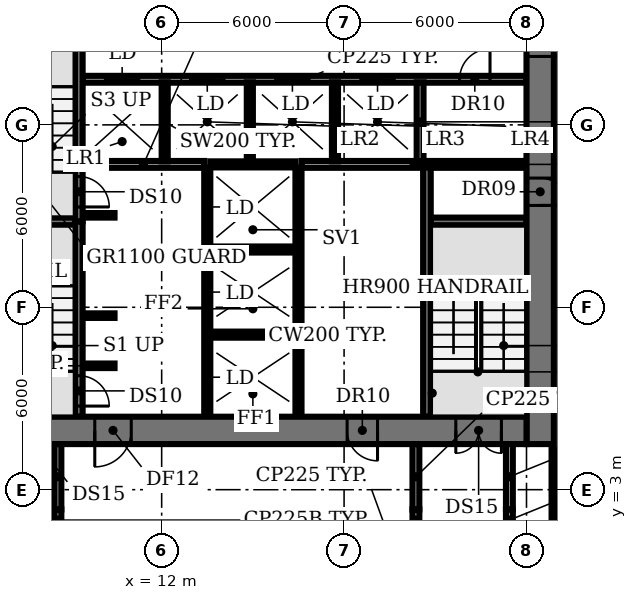
"""IFC4 building model, lengths in metres.
Left out: names, types, materials, properties, quantities, classifications, styles, units other than length and angle.
Written with IfcOpenShell. Run it as: python <this file> out.ifc"""

import sys

from ifc_helpers import new_model, si_unit, direction, frame, frame_2d, origin, place, context, subcontext, project, spatial, rectangle, extrude, element, fill, save


model = new_model("IFC4")
c1 = context("Model", 3, precision=1e-05, world=origin(), true_north=direction((0.0, 1.0)))
c2 = subcontext(c1, "Body", "Model", "MODEL_VIEW")
j1 = project(units=[si_unit("LENGTHUNIT", "METRE"), si_unit("PLANEANGLEUNIT", "RADIAN")], contexts=[c1])
p1 = place(None, origin())
s1 = spatial("IfcSite", under=j1, at=p1, CompositionType="ELEMENT")
p2 = place(p1, origin())
s2 = spatial("IfcBuilding", under=s1, at=p2, CompositionType="ELEMENT")
p3 = place(p2, origin())
s3 = spatial("IfcBuildingStorey", under=s2, at=p3, CompositionType="ELEMENT", Elevation=0.0)
p4 = place(p3, frame((9.4, 7.075, 0.0), z_axis=(0.0, 0.0, 1.0), x_axis=(1.0, 0.0, 0.0)))
e1 = element("IfcWall", 1, at=p4, inside=s3, PredefinedType="SHEAR", context=c2, shape_type="SweptSolid", body=[
    extrude(rectangle(XDim=1.05, YDim=0.15, at=frame_2d((0.525, 0.0))), origin(), (0.0, 0.0, 1.0), 5.65),
])
p5 = place(p3, frame((13.6, 8.1, 0.0), z_axis=(0.0, 0.0, 1.0), x_axis=(1.0, 0.0, 0.0)))
e2 = element("IfcWall", 2, at=p5, inside=s3, PredefinedType="SHEAR", context=c2, shape_type="SweptSolid", body=[
    extrude(rectangle(XDim=2.8, YDim=0.2, at=frame_2d((1.4, 0.0))), origin(), (0.0, 0.0, 1.0), 5.65),
])
for number, where, z_axis, x_axis in (
    (3, (9.4, 8.725, 0.0), (0.0, 0.0, 1.0), (1.0, 0.0, 0.0)),
    (4, (9.4, 10.375, 0.0), (0.0, 0.0, 1.0), (1.0, 0.0, 0.0)),
):
    element("IfcWall", number, at=place(p3, frame(where, z_axis=z_axis, x_axis=x_axis)), inside=s3, PredefinedType="SHEAR", context=c2, shape_type="SweptSolid", body=[
        extrude(rectangle(XDim=1.05, YDim=0.15, at=frame_2d((0.525, 0.0))), origin(), (0.0, 0.0, 1.0), 5.65),
    ])
p6 = place(p3, frame((13.6, 10.9, 0.0), z_axis=(0.0, 0.0, 1.0), x_axis=(1.0, 0.0, 0.0)))
e5 = element("IfcWall", 5, at=p6, inside=s3, PredefinedType="SHEAR", context=c2, shape_type="SweptSolid", body=[
    extrude(rectangle(XDim=2.8, YDim=0.2, at=frame_2d((1.4, 0.0))), origin(), (0.0, 0.0, 1.0), 5.65),
])
for number, where, z_axis, x_axis in (
    (6, (6.0, 11.825, 0.0), (0.0, 0.0, 1.0), (1.0, 0.0, 0.0)),
    (7, (20.85, 11.825, 0.0), (0.0, 0.0, 1.0), (1.0, 0.0, 0.0)),
):
    element("IfcWall", number, at=place(p3, frame(where, z_axis=z_axis, x_axis=x_axis)), inside=s3, PredefinedType="SHEAR", context=c2, shape_type="SweptSolid", body=[
        extrude(rectangle(XDim=3.15, YDim=0.25, at=frame_2d((1.575, 0.0))), origin(), (0.0, 0.0, 1.0), 5.65),
    ])
p7 = place(p3, frame((9.4, 12.025, 0.0), z_axis=(0.0, 0.0, 1.0), x_axis=(1.0, 0.0, 0.0)))
e8 = element("IfcWall", 8, at=p7, inside=s3, PredefinedType="SHEAR", context=c2, shape_type="SweptSolid", body=[
    extrude(rectangle(XDim=1.05, YDim=0.15, at=frame_2d((0.525, 0.0))), origin(), (0.0, 0.0, 1.0), 5.65),
])
p8 = place(p3, frame((9.4, 13.7, 0.0), z_axis=(0.0, 0.0, 1.0), x_axis=(1.0, 0.0, 0.0)))
e9 = element("IfcWall", 9, at=p8, inside=s3, PredefinedType="PARTITIONING", context=c2, shape_type="SweptSolid", body=[
    extrude(rectangle(XDim=4.0, YDim=0.225, at=frame_2d((2.0, 0.0))), origin(), (0.0, 0.0, 1.0), 5.65),
])
p9 = place(p3, frame((13.6, 13.7, 0.0), z_axis=(0.0, 0.0, 1.0), x_axis=(1.0, 0.0, 0.0)))
e10 = element("IfcWall", 10, at=p9, inside=s3, PredefinedType="SHEAR", context=c2, shape_type="SweptSolid", body=[
    extrude(rectangle(XDim=2.8, YDim=0.2, at=frame_2d((1.4, 0.0))), origin(), (0.0, 0.0, 1.0), 5.65),
])
p10 = place(p3, frame((16.6, 13.7, 0.0), z_axis=(0.0, 0.0, 1.0), x_axis=(1.0, 0.0, 0.0)))
e11 = element("IfcWall", 11, at=p10, inside=s3, PredefinedType="PARTITIONING", context=c2, shape_type="SweptSolid", body=[
    extrude(rectangle(XDim=7.4, YDim=0.225, at=frame_2d((3.7, 0.0))), origin(), (0.0, 0.0, 1.0), 5.65),
])
p11 = place(p3, frame((9.4, 16.5, 0.0), z_axis=(0.0, 0.0, 1.0), x_axis=(1.0, 0.0, 0.0)))
e12 = element("IfcWall", 12, at=p11, inside=s3, PredefinedType="PARTITIONING", context=c2, shape_type="SweptSolid", body=[
    extrude(rectangle(XDim=14.6, YDim=0.225, at=frame_2d((7.3, 0.0))), origin(), (0.0, 0.0, 1.0), 5.65),
])
p12 = place(p11, frame((0.75, 0.0, 0.0)))
e13 = element("IfcOpeningElement", 13, at=p12, cuts=e12, PredefinedType="OPENING", context=c2, shape_type="SweptSolid", body=[
    extrude(rectangle(XDim=1.1, YDim=2.1, at=frame_2d((0.55, 1.05))), frame((0.0, 0.123, 0.0), z_axis=(0.0, -1.0, 0.0), x_axis=(1.0, 0.0, 0.0)), (0.0, 0.0, 1.0), 0.245),
])
p13 = place(p11, frame((3.55, 0.0, 0.0)))
e14 = element("IfcOpeningElement", 14, at=p13, cuts=e12, PredefinedType="OPENING", context=c2, shape_type="SweptSolid", body=[
    extrude(rectangle(XDim=1.1, YDim=2.1, at=frame_2d((0.55, 1.05))), frame((0.0, 0.123, 0.0), z_axis=(0.0, -1.0, 0.0), x_axis=(1.0, 0.0, 0.0)), (0.0, 0.0, 1.0), 0.245),
])
p14 = place(p11, frame((6.35, 0.0, 0.0)))
e15 = element("IfcOpeningElement", 15, at=p14, cuts=e12, PredefinedType="OPENING", context=c2, shape_type="SweptSolid", body=[
    extrude(rectangle(XDim=1.1, YDim=2.1, at=frame_2d((0.55, 1.05))), frame((0.0, 0.123, 0.0), z_axis=(0.0, -1.0, 0.0), x_axis=(1.0, 0.0, 0.0)), (0.0, 0.0, 1.0), 0.245),
])
p15 = place(p11, frame((9.15, 0.0, 0.0)))
e16 = element("IfcOpeningElement", 16, at=p15, cuts=e12, PredefinedType="OPENING", context=c2, shape_type="SweptSolid", body=[
    extrude(rectangle(XDim=1.1, YDim=2.1, at=frame_2d((0.55, 1.05))), frame((0.0, 0.123, 0.0), z_axis=(0.0, -1.0, 0.0), x_axis=(1.0, 0.0, 0.0)), (0.0, 0.0, 1.0), 0.245),
])
p16 = place(p11, frame((12.4, 0.0, 0.0)))
e17 = element("IfcOpeningElement", 17, at=p16, cuts=e12, PredefinedType="OPENING", context=c2, shape_type="SweptSolid", body=[
    extrude(rectangle(XDim=1.0, YDim=2.1, at=frame_2d((0.5, 1.05))), frame((0.0, 0.123, 0.0), z_axis=(0.0, -1.0, 0.0), x_axis=(1.0, 0.0, 0.0)), (0.0, 0.0, 1.0), 0.245),
])
p17 = place(p3, frame((9.275, 11.825, 0.0), z_axis=(0.0, 0.0, 1.0), x_axis=(0.0, -1.0, 0.0)))
e18 = element("IfcWall", 18, at=p17, inside=s3, PredefinedType="SHEAR", context=c2, shape_type="SweptSolid", body=[
    extrude(rectangle(XDim=6.425, YDim=0.25, at=frame_2d((3.212, 0.0))), origin(), (0.0, 0.0, 1.0), 5.65),
])
p18 = place(p17, frame((5.075, 0.0, 0.0)))
e19 = element("IfcOpeningElement", 19, at=p18, cuts=e18, PredefinedType="OPENING", context=c2, shape_type="SweptSolid", body=[
    extrude(rectangle(XDim=1.0, YDim=2.1, at=frame_2d((0.5, 1.05))), frame((0.0, 0.135, 0.0), z_axis=(0.0, -1.0, 0.0), x_axis=(1.0, 0.0, 0.0)), (0.0, 0.0, 1.0), 0.27),
])
p19 = place(p3, frame((9.275, 18.375, 0.0), z_axis=(0.0, 0.0, 1.0), x_axis=(0.0, -1.0, 0.0)))
e20 = element("IfcWall", 20, at=p19, inside=s3, PredefinedType="SHEAR", context=c2, shape_type="SweptSolid", body=[
    extrude(rectangle(XDim=6.55, YDim=0.25, at=frame_2d((3.275, 0.0))), origin(), (0.0, 0.0, 1.0), 5.65),
])
p20 = place(p19, frame((5.075, 0.0, 0.0)))
e21 = element("IfcOpeningElement", 21, at=p20, cuts=e20, PredefinedType="OPENING", context=c2, shape_type="SweptSolid", body=[
    extrude(rectangle(XDim=1.0, YDim=2.1, at=frame_2d((0.5, 1.05))), frame((0.0, 0.135, 0.0), z_axis=(0.0, -1.0, 0.0), x_axis=(1.0, 0.0, 0.0)), (0.0, 0.0, 1.0), 0.27),
])
p21 = place(p3, frame((12.1, 13.8, 0.0), z_axis=(0.0, 0.0, 1.0), x_axis=(0.0, 1.0, 0.0)))
e22 = element("IfcWall", 22, at=p21, inside=s3, PredefinedType="SOLIDWALL", context=c2, shape_type="SweptSolid", body=[
    extrude(rectangle(XDim=2.6, YDim=0.2, at=frame_2d((1.3, 0.0))), origin(), (0.0, 0.0, 1.0), 5.65),
])
p22 = place(p3, frame((13.5, 5.4, 0.0), z_axis=(0.0, 0.0, 1.0), x_axis=(0.0, 1.0, 0.0)))
e23 = element("IfcWall", 23, at=p22, inside=s3, PredefinedType="SHEAR", context=c2, shape_type="SweptSolid", body=[
    extrude(rectangle(XDim=8.2, YDim=0.2, at=frame_2d((4.1, 0.0))), origin(), (0.0, 0.0, 1.0), 5.65),
])
p23 = place(p22, frame((0.75, 0.0, 0.0)))
e24 = element("IfcOpeningElement", 24, at=p23, cuts=e23, PredefinedType="OPENING", context=c2, shape_type="SweptSolid", body=[
    extrude(rectangle(XDim=1.1, YDim=2.1, at=frame_2d((0.55, 1.05))), frame((0.0, 0.11, 0.0), z_axis=(0.0, -1.0, 0.0), x_axis=(1.0, 0.0, 0.0)), (0.0, 0.0, 1.0), 0.22),
])
p24 = place(p22, frame((3.55, 0.0, 0.0)))
e25 = element("IfcOpeningElement", 25, at=p24, cuts=e23, PredefinedType="OPENING", context=c2, shape_type="SweptSolid", body=[
    extrude(rectangle(XDim=1.1, YDim=2.1, at=frame_2d((0.55, 1.05))), frame((0.0, 0.11, 0.0), z_axis=(0.0, -1.0, 0.0), x_axis=(1.0, 0.0, 0.0)), (0.0, 0.0, 1.0), 0.22),
])
p25 = place(p22, frame((6.35, 0.0, 0.0)))
e26 = element("IfcOpeningElement", 26, at=p25, cuts=e23, PredefinedType="OPENING", context=c2, shape_type="SweptSolid", body=[
    extrude(rectangle(XDim=1.1, YDim=2.1, at=frame_2d((0.55, 1.05))), frame((0.0, 0.11, 0.0), z_axis=(0.0, -1.0, 0.0), x_axis=(1.0, 0.0, 0.0)), (0.0, 0.0, 1.0), 0.22),
])
p26 = place(p3, frame((14.9, 13.8, 0.0), z_axis=(0.0, 0.0, 1.0), x_axis=(0.0, 1.0, 0.0)))
e27 = element("IfcWall", 27, at=p26, inside=s3, PredefinedType="SOLIDWALL", context=c2, shape_type="SweptSolid", body=[
    extrude(rectangle(XDim=2.6, YDim=0.2, at=frame_2d((1.3, 0.0))), origin(), (0.0, 0.0, 1.0), 5.65),
])
p27 = place(p3, frame((16.5, 5.4, 0.0), z_axis=(0.0, 0.0, 1.0), x_axis=(0.0, 1.0, 0.0)))
e28 = element("IfcWall", 28, at=p27, inside=s3, PredefinedType="SHEAR", context=c2, shape_type="SweptSolid", body=[
    extrude(rectangle(XDim=8.2, YDim=0.2, at=frame_2d((4.1, 0.0))), origin(), (0.0, 0.0, 1.0), 5.65),
])
p28 = place(p3, frame((17.7, 13.8, 0.0), z_axis=(0.0, 0.0, 1.0), x_axis=(0.0, 1.0, 0.0)))
e29 = element("IfcWall", 29, at=p28, inside=s3, PredefinedType="SOLIDWALL", context=c2, shape_type="SweptSolid", body=[
    extrude(rectangle(XDim=2.6, YDim=0.2, at=frame_2d((1.3, 0.0))), origin(), (0.0, 0.0, 1.0), 5.65),
])
p29 = place(p3, frame((20.5, 13.8, 0.0), z_axis=(0.0, 0.0, 1.0), x_axis=(0.0, 1.0, 0.0)))
e30 = element("IfcWall", 30, at=p29, inside=s3, PredefinedType="PARTITIONING", context=c2, shape_type="SweptSolid", body=[
    extrude(rectangle(XDim=2.6, YDim=0.225, at=frame_2d((1.3, 0.0))), origin(), (0.0, 0.0, 1.0), 5.65),
])
p30 = place(p3, frame((20.725, 5.4, 0.0), z_axis=(0.0, 0.0, 1.0), x_axis=(0.0, 1.0, 0.0)))
e31 = element("IfcWall", 31, at=p30, inside=s3, PredefinedType="SHEAR", context=c2, shape_type="SweptSolid", body=[
    extrude(rectangle(XDim=8.2, YDim=0.25, at=frame_2d((4.1, 0.0))), origin(), (0.0, 0.0, 1.0), 5.65),
])
p31 = place(p3, frame((24.45, 25.7, 0.0), z_axis=(0.0, 0.0, 1.0), x_axis=(0.0, -1.0, 0.0)))
e32 = element("IfcWall", 32, at=p31, inside=s3, PredefinedType="SHEAR", context=c2, shape_type="SweptSolid", body=[
    extrude(rectangle(XDim=21.2, YDim=0.9, at=frame_2d((10.6, 0.0))), origin(), (0.0, 0.0, 1.0), 5.65),
])
p32 = place(p31, frame((12.45, 0.0, 0.0)))
e33 = element("IfcOpeningElement", 33, at=p32, cuts=e32, PredefinedType="OPENING", context=c2, shape_type="SweptSolid", body=[
    extrude(rectangle(XDim=0.9, YDim=2.1, at=frame_2d((0.45, 1.05))), frame((0.0, 0.46, 0.0), z_axis=(0.0, -1.0, 0.0), x_axis=(1.0, 0.0, 0.0)), (0.0, 0.0, 1.0), 0.92),
])
p33 = place(p31, frame((6.45, 0.0, 0.0)))
e34 = element("IfcOpeningElement", 34, at=p33, cuts=e32, PredefinedType="OPENING", context=c2, shape_type="SweptSolid", body=[
    extrude(rectangle(XDim=2.0, YDim=2.1, at=frame_2d((1.0, 1.05))), frame((0.0, 0.46, 0.0), z_axis=(0.0, -1.0, 0.0), x_axis=(1.0, 0.0, 0.0)), (0.0, 0.0, 1.0), 0.92),
])
p34 = place(p3, frame((24.0, 4.95, 0.0), z_axis=(0.0, 0.0, 1.0), x_axis=(-1.0, 0.0, 0.0)))
e35 = element("IfcWall", 35, at=p34, inside=s3, PredefinedType="SHEAR", context=c2, shape_type="SweptSolid", body=[
    extrude(rectangle(XDim=18.0, YDim=0.9, at=frame_2d((9.0, 0.0))), origin(), (0.0, 0.0, 1.0), 5.65),
])
p35 = place(p34, frame((15.675, 0.0, 0.0)))
e36 = element("IfcOpeningElement", 36, at=p35, cuts=e35, PredefinedType="OPENING", context=c2, shape_type="SweptSolid", body=[
    extrude(rectangle(XDim=1.5, YDim=2.1, at=frame_2d((0.75, 1.05))), frame((0.0, 0.46, 0.0), z_axis=(0.0, -1.0, 0.0), x_axis=(1.0, 0.0, 0.0)), (0.0, 0.0, 1.0), 0.92),
])
p36 = place(p34, frame((0.825, 0.0, 0.0)))
e37 = element("IfcOpeningElement", 37, at=p36, cuts=e35, PredefinedType="OPENING", context=c2, shape_type="SweptSolid", body=[
    extrude(rectangle(XDim=1.5, YDim=2.1, at=frame_2d((0.75, 1.05))), frame((0.0, 0.46, 0.0), z_axis=(0.0, -1.0, 0.0), x_axis=(1.0, 0.0, 0.0)), (0.0, 0.0, 1.0), 0.92),
])
p37 = place(p34, frame((13.0, 0.0, 0.0)))
e38 = element("IfcOpeningElement", 38, at=p37, cuts=e35, PredefinedType="OPENING", context=c2, shape_type="SweptSolid", body=[
    extrude(rectangle(XDim=1.2, YDim=2.1, at=frame_2d((0.6, 1.05))), frame((0.0, 0.46, 0.0), z_axis=(0.0, -1.0, 0.0), x_axis=(1.0, 0.0, 0.0)), (0.0, 0.0, 1.0), 0.92),
])
p38 = place(p34, frame((4.9, 0.0, 0.0)))
e39 = element("IfcOpeningElement", 39, at=p38, cuts=e35, PredefinedType="OPENING", context=c2, shape_type="SweptSolid", body=[
    extrude(rectangle(XDim=1.0, YDim=2.1, at=frame_2d((0.5, 1.05))), frame((0.0, 0.46, 0.0), z_axis=(0.0, -1.0, 0.0), x_axis=(1.0, 0.0, 0.0)), (0.0, 0.0, 1.0), 0.92),
])
p39 = place(p3, frame((8.587, 2.35, 0.0), z_axis=(0.0, 0.0, 1.0), x_axis=(0.0, -1.0, 0.0)))
e40 = element("IfcWall", 40, at=p39, inside=s3, PredefinedType="PARTITIONING", context=c2, shape_type="SweptSolid", body=[
    extrude(rectangle(XDim=0.7, YDim=0.225, at=frame_2d((0.35, 0.0))), origin(), (0.0, 0.0, 1.0), 4.65),
])
p40 = place(p3, frame((8.587, 4.5, 0.0), z_axis=(0.0, 0.0, 1.0), x_axis=(0.0, -1.0, 0.0)))
e41 = element("IfcWall", 41, at=p40, inside=s3, PredefinedType="PARTITIONING", context=c2, shape_type="SweptSolid", body=[
    extrude(rectangle(XDim=2.15, YDim=0.225, at=frame_2d((1.075, 0.0))), origin(), (0.0, 0.0, 1.0), 5.65),
])
p41 = place(p3, frame((20.363, 1.65, 0.0), z_axis=(0.0, 0.0, 1.0), x_axis=(0.0, 1.0, 0.0)))
e42 = element("IfcWall", 42, at=p41, inside=s3, PredefinedType="PARTITIONING", context=c2, shape_type="SweptSolid", body=[
    extrude(rectangle(XDim=0.7, YDim=0.225, at=frame_2d((0.35, 0.0))), origin(), (0.0, 0.0, 1.0), 4.65),
])
p42 = place(p3, frame((20.363, 2.35, 0.0), z_axis=(0.0, 0.0, 1.0), x_axis=(0.0, 1.0, 0.0)))
e43 = element("IfcWall", 43, at=p42, inside=s3, PredefinedType="PARTITIONING", context=c2, shape_type="SweptSolid", body=[
    extrude(rectangle(XDim=2.15, YDim=0.225, at=frame_2d((1.075, 0.0))), origin(), (0.0, 0.0, 1.0), 5.65),
])
p43 = place(p3, frame((23.438, 2.35, 0.0), z_axis=(0.0, 0.0, 1.0), x_axis=(0.0, -1.0, 0.0)))
e44 = element("IfcWall", 44, at=p43, inside=s3, PredefinedType="PARTITIONING", context=c2, shape_type="SweptSolid", body=[
    extrude(rectangle(XDim=0.7, YDim=0.225, at=frame_2d((0.35, 0.0))), origin(), (0.0, 0.0, 1.0), 4.65),
])
p44 = place(p3, frame((23.438, 4.5, 0.0), z_axis=(0.0, 0.0, 1.0), x_axis=(0.0, -1.0, 0.0)))
e45 = element("IfcWall", 45, at=p44, inside=s3, PredefinedType="PARTITIONING", context=c2, shape_type="SweptSolid", body=[
    extrude(rectangle(XDim=2.15, YDim=0.225, at=frame_2d((1.075, 0.0))), origin(), (0.0, 0.0, 1.0), 5.65),
])
p45 = place(p3, frame((24.9, 0.6, 0.0), z_axis=(0.0, 0.0, 1.0), x_axis=(0.0, 1.0, 0.0)))
e46 = element("IfcWall", 46, at=p45, inside=s3, PredefinedType="PARTITIONING", context=c2, shape_type="SweptSolid", body=[
    extrude(rectangle(XDim=3.71, YDim=0.15, at=frame_2d((1.855, 0.0))), origin(), (0.0, 0.0, 1.0), 4.53),
])
p46 = place(p12, origin())
e47 = element("IfcDoor", 47, at=p46, inside=s3, OperationType="DOUBLE_DOOR_SLIDING", PredefinedType="DOOR", context=c2, shape_type="SweptSolid", body=[
    extrude(rectangle(XDim=1.1, YDim=2.1, at=frame_2d((0.55, 1.05))), frame((0.0, 0.025, 0.0), z_axis=(0.0, -1.0, 0.0), x_axis=(1.0, 0.0, 0.0)), (0.0, 0.0, 1.0), 0.05),
])
fill(e13, e47)
p47 = place(p13, origin())
e48 = element("IfcDoor", 48, at=p47, inside=s3, OperationType="DOUBLE_DOOR_SLIDING", PredefinedType="DOOR", context=c2, shape_type="SweptSolid", body=[
    extrude(rectangle(XDim=1.1, YDim=2.1, at=frame_2d((0.55, 1.05))), frame((0.0, 0.025, 0.0), z_axis=(0.0, -1.0, 0.0), x_axis=(1.0, 0.0, 0.0)), (0.0, 0.0, 1.0), 0.05),
])
fill(e14, e48)
p48 = place(p14, origin())
e49 = element("IfcDoor", 49, at=p48, inside=s3, OperationType="DOUBLE_DOOR_SLIDING", PredefinedType="DOOR", context=c2, shape_type="SweptSolid", body=[
    extrude(rectangle(XDim=1.1, YDim=2.1, at=frame_2d((0.55, 1.05))), frame((0.0, 0.025, 0.0), z_axis=(0.0, -1.0, 0.0), x_axis=(1.0, 0.0, 0.0)), (0.0, 0.0, 1.0), 0.05),
])
fill(e15, e49)
p49 = place(p15, origin())
e50 = element("IfcDoor", 50, at=p49, inside=s3, OperationType="DOUBLE_DOOR_SLIDING", PredefinedType="DOOR", context=c2, shape_type="SweptSolid", body=[
    extrude(rectangle(XDim=1.1, YDim=2.1, at=frame_2d((0.55, 1.05))), frame((0.0, 0.025, 0.0), z_axis=(0.0, -1.0, 0.0), x_axis=(1.0, 0.0, 0.0)), (0.0, 0.0, 1.0), 0.05),
])
fill(e16, e50)
p50 = place(p16, origin())
e51 = element("IfcDoor", 51, at=p50, inside=s3, OperationType="SINGLE_SWING_RIGHT", PredefinedType="DOOR", context=c2, shape_type="SweptSolid", body=[
    extrude(rectangle(XDim=1.0, YDim=2.1, at=frame_2d((0.5, 1.05))), frame((0.0, 0.025, 0.0), z_axis=(0.0, -1.0, 0.0), x_axis=(1.0, 0.0, 0.0)), (0.0, 0.0, 1.0), 0.05),
])
fill(e17, e51)
p51 = place(p18, origin())
e52 = element("IfcDoor", 52, at=p51, inside=s3, OperationType="SINGLE_SWING_RIGHT", PredefinedType="DOOR", context=c2, shape_type="SweptSolid", body=[
    extrude(rectangle(XDim=1.0, YDim=2.1, at=frame_2d((0.5, 1.05))), frame((0.0, 0.025, 0.0), z_axis=(0.0, -1.0, 0.0), x_axis=(1.0, 0.0, 0.0)), (0.0, 0.0, 1.0), 0.05),
])
fill(e19, e52)
p52 = place(p20, origin())
e53 = element("IfcDoor", 53, at=p52, inside=s3, OperationType="SINGLE_SWING_RIGHT", PredefinedType="DOOR", context=c2, shape_type="SweptSolid", body=[
    extrude(rectangle(XDim=1.0, YDim=2.1, at=frame_2d((0.5, 1.05))), frame((0.0, 0.025, 0.0), z_axis=(0.0, -1.0, 0.0), x_axis=(1.0, 0.0, 0.0)), (0.0, 0.0, 1.0), 0.05),
])
fill(e21, e53)
p53 = place(p23, origin())
e54 = element("IfcDoor", 54, at=p53, inside=s3, OperationType="DOUBLE_DOOR_SLIDING", PredefinedType="DOOR", context=c2, shape_type="SweptSolid", body=[
    extrude(rectangle(XDim=1.1, YDim=2.1, at=frame_2d((0.55, 1.05))), frame((0.0, 0.025, 0.0), z_axis=(0.0, -1.0, 0.0), x_axis=(1.0, 0.0, 0.0)), (0.0, 0.0, 1.0), 0.05),
])
fill(e24, e54)
p54 = place(p24, origin())
e55 = element("IfcDoor", 55, at=p54, inside=s3, OperationType="DOUBLE_DOOR_SLIDING", PredefinedType="DOOR", context=c2, shape_type="SweptSolid", body=[
    extrude(rectangle(XDim=1.1, YDim=2.1, at=frame_2d((0.55, 1.05))), frame((0.0, 0.025, 0.0), z_axis=(0.0, -1.0, 0.0), x_axis=(1.0, 0.0, 0.0)), (0.0, 0.0, 1.0), 0.05),
])
fill(e25, e55)
p55 = place(p25, origin())
e56 = element("IfcDoor", 56, at=p55, inside=s3, OperationType="DOUBLE_DOOR_SLIDING", PredefinedType="DOOR", context=c2, shape_type="SweptSolid", body=[
    extrude(rectangle(XDim=1.1, YDim=2.1, at=frame_2d((0.55, 1.05))), frame((0.0, 0.025, 0.0), z_axis=(0.0, -1.0, 0.0), x_axis=(1.0, 0.0, 0.0)), (0.0, 0.0, 1.0), 0.05),
])
fill(e26, e56)
p56 = place(p32, origin())
e57 = element("IfcDoor", 57, at=p56, inside=s3, OperationType="SINGLE_SWING_RIGHT", PredefinedType="DOOR", context=c2, shape_type="SweptSolid", body=[
    extrude(rectangle(XDim=0.9, YDim=2.1, at=frame_2d((0.45, 1.05))), frame((0.0, -0.39, 0.0), z_axis=(0.0, -1.0, 0.0), x_axis=(1.0, 0.0, 0.0)), (0.0, 0.0, 1.0), 0.05),
])
fill(e33, e57)
p57 = place(p33, origin())
e58 = element("IfcDoor", 58, at=p57, inside=s3, OperationType="DOUBLE_DOOR_SINGLE_SWING", PredefinedType="DOOR", context=c2, shape_type="SweptSolid", body=[
    extrude(rectangle(XDim=2.0, YDim=2.1, at=frame_2d((1.0, 1.05))), frame((0.0, 0.025, 0.0), z_axis=(0.0, -1.0, 0.0), x_axis=(1.0, 0.0, 0.0)), (0.0, 0.0, 1.0), 0.05),
])
fill(e34, e58)
p58 = place(p36, origin())
e59 = element("IfcDoor", 59, at=p58, inside=s3, OperationType="DOUBLE_DOOR_SINGLE_SWING", PredefinedType="DOOR", context=c2, shape_type="SweptSolid", body=[
    extrude(rectangle(XDim=1.5, YDim=2.1, at=frame_2d((0.75, 1.05))), frame((0.0, 0.025, 0.0), z_axis=(0.0, -1.0, 0.0), x_axis=(1.0, 0.0, 0.0)), (0.0, 0.0, 1.0), 0.05),
])
fill(e37, e59)
p59 = place(p37, origin())
e60 = element("IfcDoor", 60, at=p59, inside=s3, OperationType="SINGLE_SWING_RIGHT", PredefinedType="DOOR", context=c2, shape_type="SweptSolid", body=[
    extrude(rectangle(XDim=1.2, YDim=2.1, at=frame_2d((0.6, 1.05))), frame((0.0, 0.025, 0.0), z_axis=(0.0, -1.0, 0.0), x_axis=(1.0, 0.0, 0.0)), (0.0, 0.0, 1.0), 0.05),
])
fill(e38, e60)
p60 = place(p38, origin())
e61 = element("IfcDoor", 61, at=p60, inside=s3, OperationType="SINGLE_SWING_LEFT", PredefinedType="DOOR", context=c2, shape_type="SweptSolid", body=[
    extrude(rectangle(XDim=1.0, YDim=2.1, at=frame_2d((0.5, 1.05))), frame((0.0, -0.39, 0.0), z_axis=(0.0, -1.0, 0.0), x_axis=(1.0, 0.0, 0.0)), (0.0, 0.0, 1.0), 0.05),
])
fill(e39, e61)
save(model, sys.argv[1])
